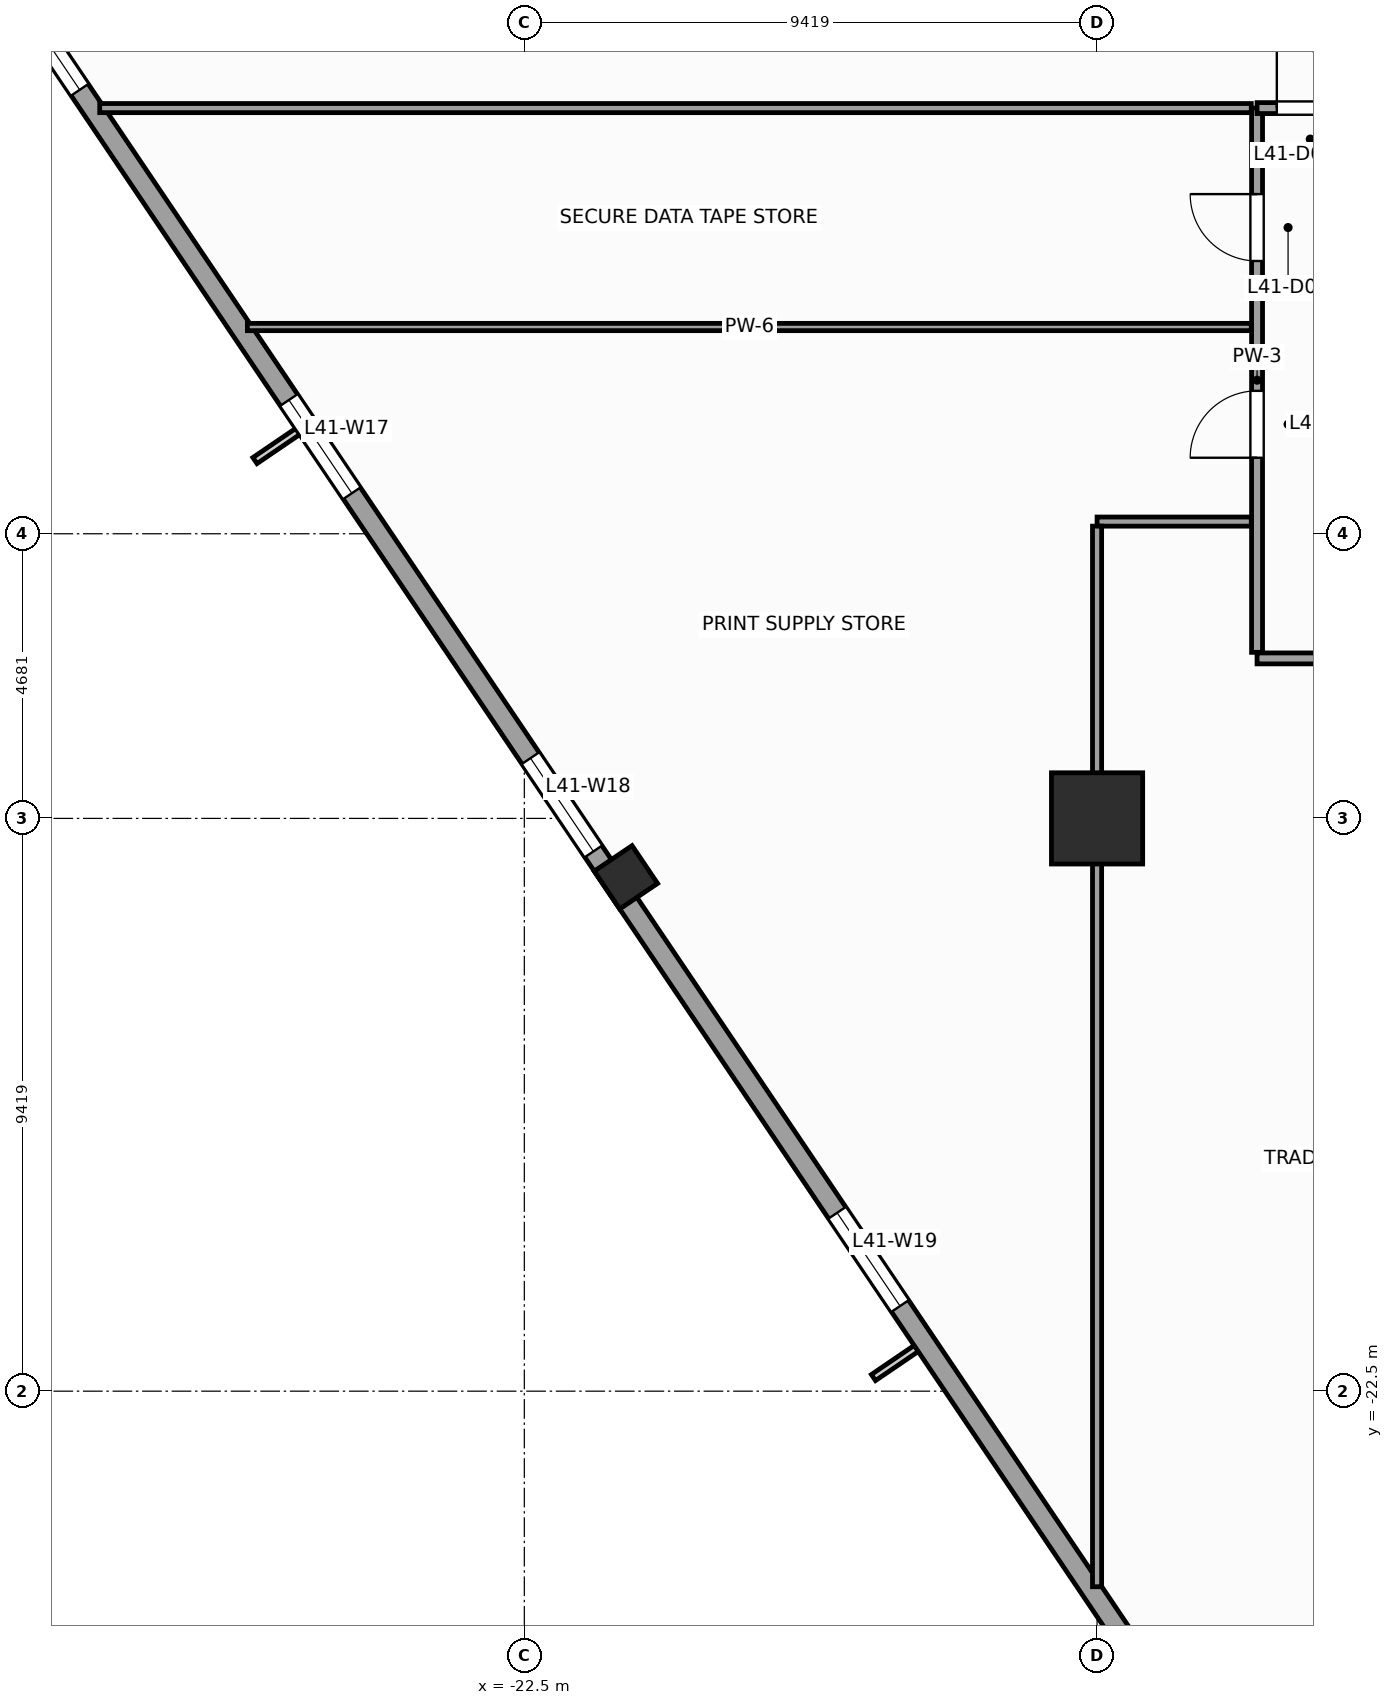
"""IFC4 building model, lengths in metres.
Left out: names, types, materials, properties, quantities, classifications, styles, units other than length and angle.
Written with IfcOpenShell. Run it as: python <this file> out.ifc"""

import sys

from ifc_helpers import new_model, si_unit, direction, frame, frame_2d, origin, origin_2d, place, context, subcontext, project, spatial, rectangle, extrude, source, transform, mapped, element, fill, save


model = new_model("IFC4")
c1 = context("Model", 3, precision=1e-05, world=origin(), true_north=direction((0.0, 1.0)))
c2 = subcontext(c1, "Body", "Model", "MODEL_VIEW")
j1 = project(units=[si_unit("LENGTHUNIT", "METRE"), si_unit("PLANEANGLEUNIT", "RADIAN")], contexts=[c1])
p1 = place(None, origin())
s1 = spatial("IfcSite", under=j1, at=p1, CompositionType="ELEMENT")
p2 = place(p1, origin())
s2 = spatial("IfcBuilding", under=s1, at=p2, CompositionType="ELEMENT")
p3 = place(p2, frame((0.0, 0.0, 172.4)))
s3 = spatial("IfcBuildingStorey", under=s2, at=p3, CompositionType="ELEMENT", Elevation=172.4)
m1 = source(origin(), c2, "Body", "SweptSolid", [
    extrude(rectangle(XDim=1.5, YDim=1.5, at=origin_2d()), origin(), (0.0, 0.0, 1.0), 4.0),
])
p4 = place(p3, frame((-13.081, -13.081, 0.0), z_axis=(0.0, 0.0, 1.0), x_axis=(1.0, 0.0, 0.0)))
e1 = element("IfcColumn", 1, at=p4, inside=s3, PredefinedType="COLUMN", context=c2, shape_type="MappedRepresentation", body=[
    mapped(m1, transform((0.0, 0.0, 0.0), scale=1.0)),
])
m2 = source(origin(), c2, "Body", "SweptSolid", [
    extrude(rectangle(XDim=0.75, YDim=0.75, at=origin_2d()), origin(), (0.0, 0.0, 1.0), 4.0),
])
p5 = place(p3, frame((-20.83, -14.05, 0.0), z_axis=(0.0, 0.0, 1.0), x_axis=(0.829037572555, 0.559192903471, 0.0)))
e2 = element("IfcColumn", 2, at=p5, inside=s3, PredefinedType="COLUMN", context=c2, shape_type="MappedRepresentation", body=[
    mapped(m2, transform((0.0, 0.0, 0.0), scale=1.0)),
])
p6 = place(p3, frame((-32.558, 2.972, 0.0), z_axis=(0.0, 0.0, 1.0), x_axis=(0.559194910251, -0.829036218961, 0.0)))
e3 = element("IfcWall", 3, at=p6, inside=s3, PredefinedType="STANDARD", context=c2, shape_type="SweptSolid", body=[
    extrude(rectangle(XDim=41.34, YDim=0.34, at=frame_2d((20.67, 0.0))), origin(), (0.0, 0.0, 1.0), 3.04),
])
p7 = place(p6, frame((3.511, 0.0, 0.56)))
e4 = element("IfcOpeningElement", 4, at=p7, cuts=e3, PredefinedType="OPENING", context=c2, shape_type="SweptSolid", body=[
    extrude(rectangle(XDim=1.4, YDim=2.4, at=frame_2d((0.7, 1.2))), frame((0.0, 0.18, 0.0), z_axis=(0.0, -1.0, 0.0), x_axis=(1.0, 0.0, 0.0)), (0.0, 0.0, 1.0), 0.36),
])
p8 = place(p6, frame((11.064, 0.0, 0.61)))
e5 = element("IfcOpeningElement", 5, at=p8, cuts=e3, PredefinedType="OPENING", context=c2, shape_type="SweptSolid", body=[
    extrude(rectangle(XDim=1.85, YDim=2.35, at=frame_2d((0.925, 1.175))), frame((0.0, 0.18, 0.0), z_axis=(0.0, -1.0, 0.0), x_axis=(1.0, 0.0, 0.0)), (0.0, 0.0, 1.0), 0.36),
])
p9 = place(p6, frame((18.168, 0.0, 0.61)))
e6 = element("IfcOpeningElement", 6, at=p9, cuts=e3, PredefinedType="OPENING", context=c2, shape_type="SweptSolid", body=[
    extrude(rectangle(XDim=1.85, YDim=2.35, at=frame_2d((0.925, 1.175))), frame((0.0, 0.18, 0.0), z_axis=(0.0, -1.0, 0.0), x_axis=(1.0, 0.0, 0.0)), (0.0, 0.0, 1.0), 0.36),
])
p10 = place(p6, frame((27.186, 0.0, 0.61)))
e7 = element("IfcOpeningElement", 7, at=p10, cuts=e3, PredefinedType="OPENING", context=c2, shape_type="SweptSolid", body=[
    extrude(rectangle(XDim=1.85, YDim=2.35, at=frame_2d((0.925, 1.175))), frame((0.0, 0.18, 0.0), z_axis=(0.0, -1.0, 0.0), x_axis=(1.0, 0.0, 0.0)), (0.0, 0.0, 1.0), 0.36),
])
p11 = place(p6, frame((35.602, 0.0, 0.56)))
e8 = element("IfcOpeningElement", 8, at=p11, cuts=e3, PredefinedType="OPENING", context=c2, shape_type="SweptSolid", body=[
    extrude(rectangle(XDim=1.4, YDim=2.4, at=frame_2d((0.7, 1.2))), frame((0.0, 0.18, 0.0), z_axis=(0.0, -1.0, 0.0), x_axis=(1.0, 0.0, 0.0)), (0.0, 0.0, 1.0), 0.36),
])
p12 = place(p3, frame((-10.45, -10.45, 0.0), z_axis=(0.0, 0.0, 1.0), x_axis=(1.0, 0.0, 0.0)))
e9 = element("IfcWall", 9, at=p12, inside=s3, PredefinedType="PARTITIONING", context=c2, shape_type="SweptSolid", body=[
    extrude(rectangle(XDim=22.05, YDim=0.18, at=frame_2d((11.025, 0.0))), origin(), (0.0, 0.0, 1.0), 3.74),
])
p13 = place(p12, frame((15.086, 0.0, 0.0)))
e10 = element("IfcOpeningElement", 10, at=p13, cuts=e9, PredefinedType="OPENING", context=c2, shape_type="SweptSolid", body=[
    extrude(rectangle(XDim=0.95, YDim=2.1, at=frame_2d((0.475, 1.05))), frame((0.0, 0.1, 0.0), z_axis=(0.0, -1.0, 0.0), x_axis=(1.0, 0.0, 0.0)), (0.0, 0.0, 1.0), 0.2),
])
p14 = place(p12, frame((7.611, 0.0, 0.0)))
e11 = element("IfcOpeningElement", 11, at=p14, cuts=e9, PredefinedType="OPENING", context=c2, shape_type="SweptSolid", body=[
    extrude(rectangle(XDim=0.95, YDim=2.1, at=frame_2d((0.475, 1.05))), frame((0.0, 0.1, 0.0), z_axis=(0.0, -1.0, 0.0), x_axis=(1.0, 0.0, 0.0)), (0.0, 0.0, 1.0), 0.2),
])
p15 = place(p12, frame((2.939, 0.0, 0.0)))
e12 = element("IfcOpeningElement", 12, at=p15, cuts=e9, PredefinedType="OPENING", context=c2, shape_type="SweptSolid", body=[
    extrude(rectangle(XDim=1.1, YDim=2.2, at=frame_2d((0.55, 1.1))), frame((0.0, 0.1, 0.0), z_axis=(0.0, -1.0, 0.0), x_axis=(1.0, 0.0, 0.0)), (0.0, 0.0, 1.0), 0.2),
])
p16 = place(p12, frame((11.175, 0.0, 0.0)))
e13 = element("IfcOpeningElement", 13, at=p16, cuts=e9, PredefinedType="OPENING", context=c2, shape_type="SweptSolid", body=[
    extrude(rectangle(XDim=1.1, YDim=2.2, at=frame_2d((0.55, 1.1))), frame((0.0, 0.1, 0.0), z_axis=(0.0, -1.0, 0.0), x_axis=(1.0, 0.0, 0.0)), (0.0, 0.0, 1.0), 0.2),
])
p17 = place(p12, frame((18.805, 0.0, 0.0)))
e14 = element("IfcOpeningElement", 14, at=p17, cuts=e9, PredefinedType="OPENING", context=c2, shape_type="SweptSolid", body=[
    extrude(rectangle(XDim=1.1, YDim=2.2, at=frame_2d((0.55, 1.1))), frame((0.0, 0.1, 0.0), z_axis=(0.0, -1.0, 0.0), x_axis=(1.0, 0.0, 0.0)), (0.0, 0.0, 1.0), 0.2),
])
p18 = place(p3, frame((-10.45, -10.35, 0.0), z_axis=(0.0, 0.0, 1.0), x_axis=(0.0, 1.0, 0.0)))
e15 = element("IfcWall", 15, at=p18, inside=s3, PredefinedType="PARTITIONING", context=c2, shape_type="SweptSolid", body=[
    extrude(rectangle(XDim=8.95, YDim=0.18, at=frame_2d((4.475, 0.0))), origin(), (0.0, 0.0, 1.0), 3.74),
])
p19 = place(p18, frame((6.436, 0.0, 0.0)))
e16 = element("IfcOpeningElement", 16, at=p19, cuts=e15, PredefinedType="OPENING", context=c2, shape_type="SweptSolid", body=[
    extrude(rectangle(XDim=1.1, YDim=2.2, at=frame_2d((0.55, 1.1))), frame((0.0, 0.1, 0.0), z_axis=(0.0, -1.0, 0.0), x_axis=(1.0, 0.0, 0.0)), (0.0, 0.0, 1.0), 0.2),
])
p20 = place(p18, frame((3.2, 0.0, 0.0)))
e17 = element("IfcOpeningElement", 17, at=p20, cuts=e15, PredefinedType="OPENING", context=c2, shape_type="SweptSolid", body=[
    extrude(rectangle(XDim=1.1, YDim=2.2, at=frame_2d((0.55, 1.1))), frame((0.0, 0.1, 0.0), z_axis=(0.0, -1.0, 0.0), x_axis=(1.0, 0.0, 0.0)), (0.0, 0.0, 1.0), 0.2),
])
p21 = place(p3, frame((-10.45, -1.4, 0.0), z_axis=(0.0, 0.0, 1.0), x_axis=(1.0, 0.0, 0.0)))
e18 = element("IfcWall", 18, at=p21, inside=s3, PredefinedType="PARTITIONING", context=c2, shape_type="SweptSolid", body=[
    extrude(rectangle(XDim=1.75, YDim=0.18, at=frame_2d((0.875, 0.0))), origin(), (0.0, 0.0, 1.0), 3.74),
])
p22 = place(p21, frame((0.325, 0.0, 0.0)))
e19 = element("IfcOpeningElement", 19, at=p22, cuts=e18, PredefinedType="OPENING", context=c2, shape_type="SweptSolid", body=[
    extrude(rectangle(XDim=1.1, YDim=2.2, at=frame_2d((0.55, 1.1))), frame((0.0, 0.1, 0.0), z_axis=(0.0, -1.0, 0.0), x_axis=(1.0, 0.0, 0.0)), (0.0, 0.0, 1.0), 0.2),
])
p23 = place(p3, frame((-29.482, -1.4, 0.0), z_axis=(0.0, 0.0, 1.0), x_axis=(1.0, 0.0, 0.0)))
e20 = element("IfcWall", 20, at=p23, inside=s3, PredefinedType="PARTITIONING", context=c2, shape_type="SweptSolid", body=[
    extrude(rectangle(XDim=18.938, YDim=0.15, at=frame_2d((9.469, 0.0))), origin(), (0.0, 0.0, 1.0), 3.74),
])
p24 = place(p3, frame((-10.545, -8.2, 0.0), z_axis=(0.0, 0.0, 1.0), x_axis=(-1.0, 0.0, 0.0)))
e21 = element("IfcWall", 21, at=p24, inside=s3, PredefinedType="PARTITIONING", context=c2, shape_type="SweptSolid", body=[
    extrude(rectangle(XDim=2.536, YDim=0.15, at=frame_2d((1.268, 0.0))), origin(), (0.0, 0.0, 1.0), 3.74),
])
p25 = place(p3, frame((-13.081, -8.275, 0.0), z_axis=(0.0, 0.0, 1.0), x_axis=(0.0, -1.0, 0.0)))
e22 = element("IfcWall", 22, at=p25, inside=s3, PredefinedType="PARTITIONING", context=c2, shape_type="SweptSolid", body=[
    extrude(rectangle(XDim=17.441, YDim=0.15, at=frame_2d((8.721, 0.0))), origin(), (0.0, 0.0, 1.0), 2.84),
])
p26 = place(p3, frame((-27.054, -5.0, 0.0), z_axis=(0.0, 0.0, 1.0), x_axis=(1.0, 0.0, 0.0)))
e23 = element("IfcWall", 23, at=p26, inside=s3, PredefinedType="PARTITIONING", context=c2, shape_type="SweptSolid", body=[
    extrude(rectangle(XDim=16.509, YDim=0.12, at=frame_2d((8.255, 0.0))), origin(), (0.0, 0.0, 1.0), 3.74),
])
m3 = source(origin(), c2, "Body", "SweptSolid", [
    extrude(rectangle(XDim=1.4, YDim=2.4, at=frame_2d((0.7, 1.2))), frame((0.0, 0.03, 0.0), z_axis=(0.0, -1.0, 0.0), x_axis=(1.0, 0.0, 0.0)), (0.0, 0.0, 1.0), 0.06),
])
p27 = place(p7, origin())
e24 = element("IfcWindow", 24, at=p27, inside=s3, PartitioningType="SINGLE_PANEL", PredefinedType="WINDOW", context=c2, shape_type="MappedRepresentation", body=[
    mapped(m3, transform((0.0, 0.0, 0.0), scale=1.0)),
])
fill(e4, e24)
m4 = source(origin(), c2, "Body", "SweptSolid", [
    extrude(rectangle(XDim=1.85, YDim=2.35, at=frame_2d((0.925, 1.175))), frame((0.0, 0.03, 0.0), z_axis=(0.0, -1.0, 0.0), x_axis=(1.0, 0.0, 0.0)), (0.0, 0.0, 1.0), 0.06),
])
p28 = place(p8, origin())
e25 = element("IfcWindow", 25, at=p28, inside=s3, PartitioningType="SINGLE_PANEL", PredefinedType="WINDOW", context=c2, shape_type="MappedRepresentation", body=[
    mapped(m4, transform((0.0, 0.0, 0.0), scale=1.0)),
])
fill(e5, e25)
p29 = place(p9, origin())
e26 = element("IfcWindow", 26, at=p29, inside=s3, PartitioningType="SINGLE_PANEL", PredefinedType="WINDOW", context=c2, shape_type="MappedRepresentation", body=[
    mapped(m4, transform((0.0, 0.0, 0.0), scale=1.0)),
])
fill(e6, e26)
p30 = place(p10, origin())
e27 = element("IfcWindow", 27, at=p30, inside=s3, PartitioningType="SINGLE_PANEL", PredefinedType="WINDOW", context=c2, shape_type="MappedRepresentation", body=[
    mapped(m4, transform((0.0, 0.0, 0.0), scale=1.0)),
])
fill(e7, e27)
m5 = source(origin(), c2, "Body", "SweptSolid", [
    extrude(rectangle(XDim=1.1, YDim=2.2, at=frame_2d((0.55, 1.1))), frame((0.0, 0.025, 0.0), z_axis=(0.0, -1.0, 0.0), x_axis=(1.0, 0.0, 0.0)), (0.0, 0.0, 1.0), 0.05),
])
p31 = place(p22, origin())
e28 = element("IfcDoor", 28, at=p31, inside=s3, OperationType="SINGLE_SWING_LEFT", PredefinedType="DOOR", context=c2, shape_type="MappedRepresentation", body=[
    mapped(m5, transform((0.0, 0.0, 0.0), scale=1.0)),
])
fill(e19, e28)
p32 = place(p19, origin())
e29 = element("IfcDoor", 29, at=p32, inside=s3, OperationType="SINGLE_SWING_RIGHT", PredefinedType="DOOR", context=c2, shape_type="MappedRepresentation", body=[
    mapped(m5, transform((0.0, 0.0, 0.0), scale=1.0)),
])
fill(e16, e29)
p33 = place(p20, origin())
e30 = element("IfcDoor", 30, at=p33, inside=s3, OperationType="SINGLE_SWING_LEFT", PredefinedType="DOOR", context=c2, shape_type="MappedRepresentation", body=[
    mapped(m5, transform((0.0, 0.0, 0.0), scale=1.0)),
])
fill(e17, e30)
save(model, sys.argv[1])
